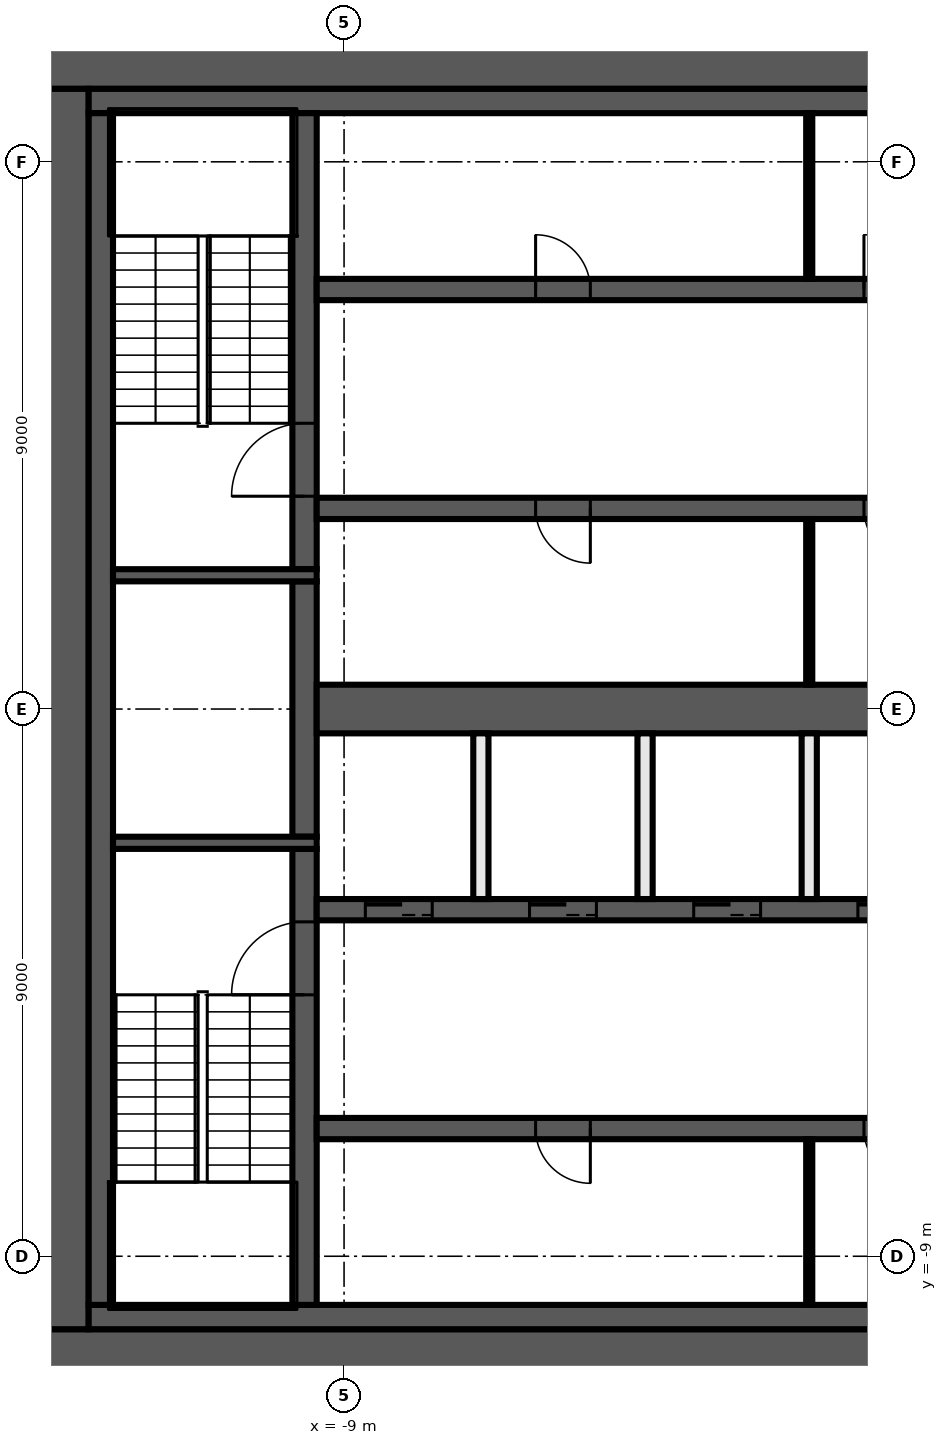
"""IFC4 building model, lengths in metres.
Left out: names, types, materials, properties, quantities, classifications, styles, units other than length and angle.
Written with IfcOpenShell. Run it as: python <this file> out.ifc"""

import sys

from ifc_helpers import new_model, si_unit, direction, frame, frame_2d, origin, place, context, subcontext, project, spatial, rectangle, extrude, element, fill, save


model = new_model("IFC4")
c1 = context("Model", 3, precision=1e-05, world=origin(), true_north=direction((0.0, 1.0)))
c2 = subcontext(c1, "Body", "Model", "MODEL_VIEW")
j1 = project(units=[si_unit("LENGTHUNIT", "METRE"), si_unit("PLANEANGLEUNIT", "RADIAN")], contexts=[c1])
p1 = place(None, origin())
s1 = spatial("IfcSite", under=j1, at=p1, CompositionType="ELEMENT")
p2 = place(p1, origin())
s2 = spatial("IfcBuilding", under=s1, at=p2, CompositionType="ELEMENT")
p3 = place(p2, frame((0.0, 0.0, 171.2)))
s3 = spatial("IfcBuildingStorey", under=s2, at=p3, CompositionType="ELEMENT", Elevation=171.2)
p4 = place(p3, frame((-14.0, 10.6, 0.0), z_axis=(0.0, 0.0, 1.0), x_axis=(1.0, 0.0, 0.0)))
e1 = element("IfcWall", 1, at=p4, inside=s3, PredefinedType="SHEAR", context=c2, shape_type="SweptSolid", body=[
    extrude(rectangle(XDim=28.0, YDim=0.8, at=frame_2d((14.0, 0.0))), origin(), (0.0, 0.0, 1.0), 3.82),
])
p5 = place(p4, frame((15.9, 0.0, 0.0)))
e2 = element("IfcOpeningElement", 2, at=p5, cuts=e1, PredefinedType="OPENING", context=c2, shape_type="SweptSolid", body=[
    extrude(rectangle(XDim=1.6, YDim=2.1, at=frame_2d((0.8, 1.05))), frame((0.0, 0.41, 0.0), z_axis=(0.0, -1.0, 0.0), x_axis=(1.0, 0.0, 0.0)), (0.0, 0.0, 1.0), 0.82),
])
p6 = place(p3, frame((14.0, -10.6, 0.0), z_axis=(0.0, 0.0, 1.0), x_axis=(-1.0, 0.0, 0.0)))
e3 = element("IfcWall", 3, at=p6, inside=s3, PredefinedType="SHEAR", context=c2, shape_type="SweptSolid", body=[
    extrude(rectangle(XDim=28.0, YDim=0.8, at=frame_2d((14.0, 0.0))), origin(), (0.0, 0.0, 1.0), 3.82),
])
p7 = place(p6, frame((5.1, 0.0, 0.0)))
e4 = element("IfcOpeningElement", 4, at=p7, cuts=e3, PredefinedType="OPENING", context=c2, shape_type="SweptSolid", body=[
    extrude(rectangle(XDim=1.6, YDim=2.1, at=frame_2d((0.8, 1.05))), frame((0.0, 0.41, 0.0), z_axis=(0.0, -1.0, 0.0), x_axis=(1.0, 0.0, 0.0)), (0.0, 0.0, 1.0), 0.82),
])
p8 = place(p3, frame((-13.6, -10.2, 0.0), z_axis=(0.0, 0.0, 1.0), x_axis=(0.0, 1.0, 0.0)))
e5 = element("IfcWall", 5, at=p8, inside=s3, PredefinedType="SHEAR", context=c2, shape_type="SweptSolid", body=[
    extrude(rectangle(XDim=20.4, YDim=0.8, at=frame_2d((10.2, 0.0))), origin(), (0.0, 0.0, 1.0), 3.82),
])
p9 = place(p3, frame((-13.2, 10.0, 0.0), z_axis=(0.0, 0.0, 1.0), x_axis=(1.0, 0.0, 0.0)))
e6 = element("IfcWall", 6, at=p9, inside=s3, PredefinedType="SHEAR", context=c2, shape_type="SweptSolid", body=[
    extrude(rectangle(XDim=14.7, YDim=0.4, at=frame_2d((7.35, 0.0))), origin(), (0.0, 0.0, 1.0), 3.82),
])
p10 = place(p3, frame((6.9, -10.0, 0.0), z_axis=(0.0, 0.0, 1.0), x_axis=(-1.0, 0.0, 0.0)))
e7 = element("IfcWall", 7, at=p10, inside=s3, PredefinedType="SHEAR", context=c2, shape_type="SweptSolid", body=[
    extrude(rectangle(XDim=20.1, YDim=0.4, at=frame_2d((10.05, 0.0))), origin(), (0.0, 0.0, 1.0), 3.82),
])
p11 = place(p3, frame((-13.0, -9.8, 0.0), z_axis=(0.0, 0.0, 1.0), x_axis=(0.0, 1.0, 0.0)))
e8 = element("IfcWall", 8, at=p11, inside=s3, PredefinedType="SHEAR", context=c2, shape_type="SweptSolid", body=[
    extrude(rectangle(XDim=19.6, YDim=0.4, at=frame_2d((9.8, 0.0))), origin(), (0.0, 0.0, 1.0), 3.82),
])
p12 = place(p3, frame((-9.65, -9.8, 0.0), z_axis=(0.0, 0.0, 1.0), x_axis=(0.0, 1.0, 0.0)))
e9 = element("IfcWall", 9, at=p12, inside=s3, PredefinedType="SHEAR", context=c2, shape_type="SweptSolid", body=[
    extrude(rectangle(XDim=7.5, YDim=0.4, at=frame_2d((3.75, 0.0))), origin(), (0.0, 0.0, 1.0), 3.82),
])
p13 = place(p12, frame((5.1, 0.0, 0.0)))
e10 = element("IfcOpeningElement", 10, at=p13, cuts=e9, PredefinedType="OPENING", context=c2, shape_type="SweptSolid", body=[
    extrude(rectangle(XDim=1.2, YDim=2.1, at=frame_2d((0.6, 1.05))), frame((0.0, 0.21, 0.0), z_axis=(0.0, -1.0, 0.0), x_axis=(1.0, 0.0, 0.0)), (0.0, 0.0, 1.0), 0.42),
])
p14 = place(p3, frame((-9.65, -2.1, 0.0), z_axis=(0.0, 0.0, 1.0), x_axis=(0.0, 1.0, 0.0)))
e11 = element("IfcWall", 11, at=p14, inside=s3, PredefinedType="SHEAR", context=c2, shape_type="SweptSolid", body=[
    extrude(rectangle(XDim=4.2, YDim=0.4, at=frame_2d((2.1, 0.0))), origin(), (0.0, 0.0, 1.0), 3.82),
])
p15 = place(p3, frame((-9.65, 2.3, 0.0), z_axis=(0.0, 0.0, 1.0), x_axis=(0.0, 1.0, 0.0)))
e12 = element("IfcWall", 12, at=p15, inside=s3, PredefinedType="SHEAR", context=c2, shape_type="SweptSolid", body=[
    extrude(rectangle(XDim=7.5, YDim=0.4, at=frame_2d((3.75, 0.0))), origin(), (0.0, 0.0, 1.0), 3.82),
])
p16 = place(p15, frame((1.2, 0.0, 0.0)))
e13 = element("IfcOpeningElement", 13, at=p16, cuts=e12, PredefinedType="OPENING", context=c2, shape_type="SweptSolid", body=[
    extrude(rectangle(XDim=1.2, YDim=2.1, at=frame_2d((0.6, 1.05))), frame((0.0, 0.21, 0.0), z_axis=(0.0, -1.0, 0.0), x_axis=(1.0, 0.0, 0.0)), (0.0, 0.0, 1.0), 0.42),
])
for number, where, z_axis, x_axis in (
    (14, (-9.45, 2.2, 0.0), (0.0, 0.0, 1.0), (-1.0, 0.0, 0.0)),
    (15, (-9.45, -2.2, 0.0), (0.0, 0.0, 1.0), (-1.0, 0.0, 0.0)),
):
    element("IfcWall", number, at=place(p3, frame(where, z_axis=z_axis, x_axis=x_axis)), inside=s3, PredefinedType="SHEAR", context=c2, shape_type="SweptSolid", body=[
        extrude(rectangle(XDim=3.35, YDim=0.2, at=frame_2d((1.675, 0.0))), origin(), (0.0, 0.0, 1.0), 3.82),
    ])
p17 = place(p3, frame((-9.45, 6.9, 0.0), z_axis=(0.0, 0.0, 1.0), x_axis=(1.0, 0.0, 0.0)))
e16 = element("IfcWall", 16, at=p17, inside=s3, PredefinedType="SHEAR", context=c2, shape_type="SweptSolid", body=[
    extrude(rectangle(XDim=18.9, YDim=0.35, at=frame_2d((9.45, 0.0))), origin(), (0.0, 0.0, 1.0), 3.82),
])
p18 = place(p17, frame((11.55, 0.0, 0.0)))
e17 = element("IfcOpeningElement", 17, at=p18, cuts=e16, PredefinedType="OPENING", context=c2, shape_type="SweptSolid", body=[
    extrude(rectangle(XDim=1.2, YDim=2.1, at=frame_2d((0.6, 1.05))), frame((0.0, 0.185, 0.0), z_axis=(0.0, -1.0, 0.0), x_axis=(1.0, 0.0, 0.0)), (0.0, 0.0, 1.0), 0.37),
])
p19 = place(p17, frame((14.3, 0.0, 0.0)))
e18 = element("IfcOpeningElement", 18, at=p19, cuts=e16, PredefinedType="OPENING", context=c2, shape_type="SweptSolid", body=[
    extrude(rectangle(XDim=1.1, YDim=2.1, at=frame_2d((0.55, 1.05))), frame((0.0, 0.185, 0.0), z_axis=(0.0, -1.0, 0.0), x_axis=(1.0, 0.0, 0.0)), (0.0, 0.0, 1.0), 0.37),
])
p20 = place(p17, frame((17.0, 0.0, 0.0)))
e19 = element("IfcOpeningElement", 19, at=p20, cuts=e16, PredefinedType="OPENING", context=c2, shape_type="SweptSolid", body=[
    extrude(rectangle(XDim=1.1, YDim=2.1, at=frame_2d((0.55, 1.05))), frame((0.0, 0.185, 0.0), z_axis=(0.0, -1.0, 0.0), x_axis=(1.0, 0.0, 0.0)), (0.0, 0.0, 1.0), 0.37),
])
p21 = place(p17, frame((3.6, 0.0, 0.0)))
e20 = element("IfcOpeningElement", 20, at=p21, cuts=e16, PredefinedType="OPENING", context=c2, shape_type="SweptSolid", body=[
    extrude(rectangle(XDim=0.9, YDim=2.1, at=frame_2d((0.45, 1.05))), frame((0.0, 0.185, 0.0), z_axis=(0.0, -1.0, 0.0), x_axis=(1.0, 0.0, 0.0)), (0.0, 0.0, 1.0), 0.37),
])
p22 = place(p17, frame((9.0, 0.0, 0.0)))
e21 = element("IfcOpeningElement", 21, at=p22, cuts=e16, PredefinedType="OPENING", context=c2, shape_type="SweptSolid", body=[
    extrude(rectangle(XDim=0.9, YDim=2.1, at=frame_2d((0.45, 1.05))), frame((0.0, 0.185, 0.0), z_axis=(0.0, -1.0, 0.0), x_axis=(1.0, 0.0, 0.0)), (0.0, 0.0, 1.0), 0.37),
])
p23 = place(p3, frame((9.45, 3.3, 0.0), z_axis=(0.0, 0.0, 1.0), x_axis=(-1.0, 0.0, 0.0)))
e22 = element("IfcWall", 22, at=p23, inside=s3, PredefinedType="SHEAR", context=c2, shape_type="SweptSolid", body=[
    extrude(rectangle(XDim=18.9, YDim=0.35, at=frame_2d((9.45, 0.0))), origin(), (0.0, 0.0, 1.0), 3.82),
])
p24 = place(p23, frame((6.2, 0.0, 0.0)))
e23 = element("IfcOpeningElement", 23, at=p24, cuts=e22, PredefinedType="OPENING", context=c2, shape_type="SweptSolid", body=[
    extrude(rectangle(XDim=1.1, YDim=2.1, at=frame_2d((0.55, 1.05))), frame((0.0, 0.185, 0.0), z_axis=(0.0, -1.0, 0.0), x_axis=(1.0, 0.0, 0.0)), (0.0, 0.0, 1.0), 0.37),
])
p25 = place(p23, frame((3.5, 0.0, 0.0)))
e24 = element("IfcOpeningElement", 24, at=p25, cuts=e22, PredefinedType="OPENING", context=c2, shape_type="SweptSolid", body=[
    extrude(rectangle(XDim=1.1, YDim=2.1, at=frame_2d((0.55, 1.05))), frame((0.0, 0.185, 0.0), z_axis=(0.0, -1.0, 0.0), x_axis=(1.0, 0.0, 0.0)), (0.0, 0.0, 1.0), 0.37),
])
p26 = place(p23, frame((0.9, 0.0, 0.0)))
e25 = element("IfcOpeningElement", 25, at=p26, cuts=e22, PredefinedType="OPENING", context=c2, shape_type="SweptSolid", body=[
    extrude(rectangle(XDim=0.9, YDim=2.1, at=frame_2d((0.45, 1.05))), frame((0.0, 0.185, 0.0), z_axis=(0.0, -1.0, 0.0), x_axis=(1.0, 0.0, 0.0)), (0.0, 0.0, 1.0), 0.37),
])
p27 = place(p23, frame((14.4, 0.0, 0.0)))
e26 = element("IfcOpeningElement", 26, at=p27, cuts=e22, PredefinedType="OPENING", context=c2, shape_type="SweptSolid", body=[
    extrude(rectangle(XDim=0.9, YDim=2.1, at=frame_2d((0.45, 1.05))), frame((0.0, 0.185, 0.0), z_axis=(0.0, -1.0, 0.0), x_axis=(1.0, 0.0, 0.0)), (0.0, 0.0, 1.0), 0.37),
])
p28 = place(p23, frame((9.0, 0.0, 0.0)))
e27 = element("IfcOpeningElement", 27, at=p28, cuts=e22, PredefinedType="OPENING", context=c2, shape_type="SweptSolid", body=[
    extrude(rectangle(XDim=0.9, YDim=2.1, at=frame_2d((0.45, 1.05))), frame((0.0, 0.185, 0.0), z_axis=(0.0, -1.0, 0.0), x_axis=(1.0, 0.0, 0.0)), (0.0, 0.0, 1.0), 0.37),
])
p29 = place(p3, frame((-9.45, -3.3, 0.0), z_axis=(0.0, 0.0, 1.0), x_axis=(1.0, 0.0, 0.0)))
e28 = element("IfcWall", 28, at=p29, inside=s3, PredefinedType="SHEAR", context=c2, shape_type="SweptSolid", body=[
    extrude(rectangle(XDim=18.9, YDim=0.35, at=frame_2d((9.45, 0.0))), origin(), (0.0, 0.0, 1.0), 3.82),
])
p30 = place(p29, frame((0.8, 0.0, 0.0)))
e29 = element("IfcOpeningElement", 29, at=p30, cuts=e28, PredefinedType="OPENING", context=c2, shape_type="SweptSolid", body=[
    extrude(rectangle(XDim=1.1, YDim=2.1, at=frame_2d((0.55, 1.05))), frame((0.0, 0.185, 0.0), z_axis=(0.0, -1.0, 0.0), x_axis=(1.0, 0.0, 0.0)), (0.0, 0.0, 1.0), 0.37),
])
p31 = place(p29, frame((3.5, 0.0, 0.0)))
e30 = element("IfcOpeningElement", 30, at=p31, cuts=e28, PredefinedType="OPENING", context=c2, shape_type="SweptSolid", body=[
    extrude(rectangle(XDim=1.1, YDim=2.1, at=frame_2d((0.55, 1.05))), frame((0.0, 0.185, 0.0), z_axis=(0.0, -1.0, 0.0), x_axis=(1.0, 0.0, 0.0)), (0.0, 0.0, 1.0), 0.37),
])
p32 = place(p29, frame((6.2, 0.0, 0.0)))
e31 = element("IfcOpeningElement", 31, at=p32, cuts=e28, PredefinedType="OPENING", context=c2, shape_type="SweptSolid", body=[
    extrude(rectangle(XDim=1.1, YDim=2.1, at=frame_2d((0.55, 1.05))), frame((0.0, 0.185, 0.0), z_axis=(0.0, -1.0, 0.0), x_axis=(1.0, 0.0, 0.0)), (0.0, 0.0, 1.0), 0.37),
])
p33 = place(p29, frame((8.9, 0.0, 0.0)))
e32 = element("IfcOpeningElement", 32, at=p33, cuts=e28, PredefinedType="OPENING", context=c2, shape_type="SweptSolid", body=[
    extrude(rectangle(XDim=1.1, YDim=2.1, at=frame_2d((0.55, 1.05))), frame((0.0, 0.185, 0.0), z_axis=(0.0, -1.0, 0.0), x_axis=(1.0, 0.0, 0.0)), (0.0, 0.0, 1.0), 0.37),
])
p34 = place(p29, frame((17.0, 0.0, 0.0)))
e33 = element("IfcOpeningElement", 33, at=p34, cuts=e28, PredefinedType="OPENING", context=c2, shape_type="SweptSolid", body=[
    extrude(rectangle(XDim=1.1, YDim=2.1, at=frame_2d((0.55, 1.05))), frame((0.0, 0.185, 0.0), z_axis=(0.0, -1.0, 0.0), x_axis=(1.0, 0.0, 0.0)), (0.0, 0.0, 1.0), 0.37),
])
p35 = place(p29, frame((11.7, 0.0, 0.0)))
e34 = element("IfcOpeningElement", 34, at=p35, cuts=e28, PredefinedType="OPENING", context=c2, shape_type="SweptSolid", body=[
    extrude(rectangle(XDim=0.9, YDim=2.1, at=frame_2d((0.45, 1.05))), frame((0.0, 0.185, 0.0), z_axis=(0.0, -1.0, 0.0), x_axis=(1.0, 0.0, 0.0)), (0.0, 0.0, 1.0), 0.37),
])
p36 = place(p29, frame((14.4, 0.0, 0.0)))
e35 = element("IfcOpeningElement", 35, at=p36, cuts=e28, PredefinedType="OPENING", context=c2, shape_type="SweptSolid", body=[
    extrude(rectangle(XDim=0.9, YDim=2.1, at=frame_2d((0.45, 1.05))), frame((0.0, 0.185, 0.0), z_axis=(0.0, -1.0, 0.0), x_axis=(1.0, 0.0, 0.0)), (0.0, 0.0, 1.0), 0.37),
])
p37 = place(p3, frame((9.45, -6.9, 0.0), z_axis=(0.0, 0.0, 1.0), x_axis=(-1.0, 0.0, 0.0)))
e36 = element("IfcWall", 36, at=p37, inside=s3, PredefinedType="SHEAR", context=c2, shape_type="SweptSolid", body=[
    extrude(rectangle(XDim=18.9, YDim=0.35, at=frame_2d((9.45, 0.0))), origin(), (0.0, 0.0, 1.0), 3.82),
])
p38 = place(p37, frame((0.75, 0.0, 0.0)))
e37 = element("IfcOpeningElement", 37, at=p38, cuts=e36, PredefinedType="OPENING", context=c2, shape_type="SweptSolid", body=[
    extrude(rectangle(XDim=1.2, YDim=2.1, at=frame_2d((0.6, 1.05))), frame((0.0, 0.185, 0.0), z_axis=(0.0, -1.0, 0.0), x_axis=(1.0, 0.0, 0.0)), (0.0, 0.0, 1.0), 0.37),
])
p39 = place(p37, frame((14.4, 0.0, 0.0)))
e38 = element("IfcOpeningElement", 38, at=p39, cuts=e36, PredefinedType="OPENING", context=c2, shape_type="SweptSolid", body=[
    extrude(rectangle(XDim=0.9, YDim=2.1, at=frame_2d((0.45, 1.05))), frame((0.0, 0.185, 0.0), z_axis=(0.0, -1.0, 0.0), x_axis=(1.0, 0.0, 0.0)), (0.0, 0.0, 1.0), 0.37),
])
p40 = place(p37, frame((9.0, 0.0, 0.0)))
e39 = element("IfcOpeningElement", 39, at=p40, cuts=e36, PredefinedType="OPENING", context=c2, shape_type="SweptSolid", body=[
    extrude(rectangle(XDim=0.9, YDim=2.1, at=frame_2d((0.45, 1.05))), frame((0.0, 0.185, 0.0), z_axis=(0.0, -1.0, 0.0), x_axis=(1.0, 0.0, 0.0)), (0.0, 0.0, 1.0), 0.37),
])
p41 = place(p3, frame((-9.45, 0.0, 0.0), z_axis=(0.0, 0.0, 1.0), x_axis=(1.0, 0.0, 0.0)))
e40 = element("IfcWall", 40, at=p41, inside=s3, PredefinedType="SHEAR", context=c2, shape_type="SweptSolid", body=[
    extrude(rectangle(XDim=18.9, YDim=0.8, at=frame_2d((9.45, 0.0))), origin(), (0.0, 0.0, 1.0), 3.82),
])
for number, where, z_axis, x_axis in (
    (41, (-1.35, -9.8, 0.0), (0.0, 0.0, 1.0), (0.0, 1.0, 0.0)),
    (42, (-1.35, 0.4, 0.0), (0.0, 0.0, 1.0), (0.0, 1.0, 0.0)),
    (43, (-1.35, 7.075, 0.0), (0.0, 0.0, 1.0), (0.0, 1.0, 0.0)),
):
    element("IfcWall", number, at=place(p3, frame(where, z_axis=z_axis, x_axis=x_axis)), inside=s3, PredefinedType="PARTITIONING", context=c2, shape_type="SweptSolid", body=[
        extrude(rectangle(XDim=2.725, YDim=0.1, at=frame_2d((1.363, 0.0))), origin(), (0.0, 0.0, 1.0), 3.82),
    ])
for number, where, z_axis, x_axis in (
    (44, (-1.35, -3.125, 0.0), (0.0, 0.0, 1.0), (0.0, 1.0, 0.0)),
    (45, (-4.05, -3.125, 0.0), (0.0, 0.0, 1.0), (0.0, 1.0, 0.0)),
    (46, (-6.75, -3.125, 0.0), (0.0, 0.0, 1.0), (0.0, 1.0, 0.0)),
):
    element("IfcWall", number, at=place(p3, frame(where, z_axis=z_axis, x_axis=x_axis)), inside=s3, PredefinedType="SOLIDWALL", context=c2, shape_type="SweptSolid", body=[
        extrude(rectangle(XDim=2.725, YDim=0.25, at=frame_2d((1.363, 0.0))), origin(), (0.0, 0.0, 1.0), 3.82),
    ])
p42 = place(p30, origin())
e47 = element("IfcDoor", 47, at=p42, inside=s3, OperationType="DOUBLE_DOOR_SLIDING", PredefinedType="DOOR", context=c2, shape_type="SweptSolid", body=[
    extrude(rectangle(XDim=1.1, YDim=2.1, at=frame_2d((0.55, 1.05))), frame((0.0, 0.025, 0.0), z_axis=(0.0, -1.0, 0.0), x_axis=(1.0, 0.0, 0.0)), (0.0, 0.0, 1.0), 0.05),
])
fill(e29, e47)
p43 = place(p31, origin())
e48 = element("IfcDoor", 48, at=p43, inside=s3, OperationType="DOUBLE_DOOR_SLIDING", PredefinedType="DOOR", context=c2, shape_type="SweptSolid", body=[
    extrude(rectangle(XDim=1.1, YDim=2.1, at=frame_2d((0.55, 1.05))), frame((0.0, 0.025, 0.0), z_axis=(0.0, -1.0, 0.0), x_axis=(1.0, 0.0, 0.0)), (0.0, 0.0, 1.0), 0.05),
])
fill(e30, e48)
p44 = place(p32, origin())
e49 = element("IfcDoor", 49, at=p44, inside=s3, OperationType="DOUBLE_DOOR_SLIDING", PredefinedType="DOOR", context=c2, shape_type="SweptSolid", body=[
    extrude(rectangle(XDim=1.1, YDim=2.1, at=frame_2d((0.55, 1.05))), frame((0.0, 0.025, 0.0), z_axis=(0.0, -1.0, 0.0), x_axis=(1.0, 0.0, 0.0)), (0.0, 0.0, 1.0), 0.05),
])
fill(e31, e49)
p45 = place(p33, origin())
e50 = element("IfcDoor", 50, at=p45, inside=s3, OperationType="DOUBLE_DOOR_SLIDING", PredefinedType="DOOR", context=c2, shape_type="SweptSolid", body=[
    extrude(rectangle(XDim=1.1, YDim=2.1, at=frame_2d((0.55, 1.05))), frame((0.0, 0.025, 0.0), z_axis=(0.0, -1.0, 0.0), x_axis=(1.0, 0.0, 0.0)), (0.0, 0.0, 1.0), 0.05),
])
fill(e32, e50)
p46 = place(p21, origin())
e51 = element("IfcDoor", 51, at=p46, inside=s3, OperationType="SINGLE_SWING_RIGHT", PredefinedType="DOOR", context=c2, shape_type="SweptSolid", body=[
    extrude(rectangle(XDim=0.9, YDim=2.1, at=frame_2d((0.45, 1.05))), frame((0.0, 0.025, 0.0), z_axis=(0.0, -1.0, 0.0), x_axis=(1.0, 0.0, 0.0)), (0.0, 0.0, 1.0), 0.05),
])
fill(e20, e51)
p47 = place(p22, origin())
e52 = element("IfcDoor", 52, at=p47, inside=s3, OperationType="SINGLE_SWING_LEFT", PredefinedType="DOOR", context=c2, shape_type="SweptSolid", body=[
    extrude(rectangle(XDim=0.9, YDim=2.1, at=frame_2d((0.45, 1.05))), frame((0.0, 0.025, 0.0), z_axis=(0.0, -1.0, 0.0), x_axis=(1.0, 0.0, 0.0)), (0.0, 0.0, 1.0), 0.05),
])
fill(e21, e52)
p48 = place(p27, origin())
e53 = element("IfcDoor", 53, at=p48, inside=s3, OperationType="SINGLE_SWING_RIGHT", PredefinedType="DOOR", context=c2, shape_type="SweptSolid", body=[
    extrude(rectangle(XDim=0.9, YDim=2.1, at=frame_2d((0.45, 1.05))), frame((0.0, 0.025, 0.0), z_axis=(0.0, -1.0, 0.0), x_axis=(1.0, 0.0, 0.0)), (0.0, 0.0, 1.0), 0.05),
])
fill(e26, e53)
p49 = place(p28, origin())
e54 = element("IfcDoor", 54, at=p49, inside=s3, OperationType="SINGLE_SWING_LEFT", PredefinedType="DOOR", context=c2, shape_type="SweptSolid", body=[
    extrude(rectangle(XDim=0.9, YDim=2.1, at=frame_2d((0.45, 1.05))), frame((0.0, 0.025, 0.0), z_axis=(0.0, -1.0, 0.0), x_axis=(1.0, 0.0, 0.0)), (0.0, 0.0, 1.0), 0.05),
])
fill(e27, e54)
p50 = place(p39, origin())
e55 = element("IfcDoor", 55, at=p50, inside=s3, OperationType="SINGLE_SWING_RIGHT", PredefinedType="DOOR", context=c2, shape_type="SweptSolid", body=[
    extrude(rectangle(XDim=0.9, YDim=2.1, at=frame_2d((0.45, 1.05))), frame((0.0, 0.025, 0.0), z_axis=(0.0, -1.0, 0.0), x_axis=(1.0, 0.0, 0.0)), (0.0, 0.0, 1.0), 0.05),
])
fill(e38, e55)
p51 = place(p40, origin())
e56 = element("IfcDoor", 56, at=p51, inside=s3, OperationType="SINGLE_SWING_LEFT", PredefinedType="DOOR", context=c2, shape_type="SweptSolid", body=[
    extrude(rectangle(XDim=0.9, YDim=2.1, at=frame_2d((0.45, 1.05))), frame((0.0, 0.025, 0.0), z_axis=(0.0, -1.0, 0.0), x_axis=(1.0, 0.0, 0.0)), (0.0, 0.0, 1.0), 0.05),
])
fill(e39, e56)
p52 = place(p16, origin())
e57 = element("IfcDoor", 57, at=p52, inside=s3, OperationType="SINGLE_SWING_RIGHT", PredefinedType="DOOR", context=c2, shape_type="SweptSolid", body=[
    extrude(rectangle(XDim=1.2, YDim=2.1, at=frame_2d((0.6, 1.05))), frame((0.0, 0.025, 0.0), z_axis=(0.0, -1.0, 0.0), x_axis=(1.0, 0.0, 0.0)), (0.0, 0.0, 1.0), 0.05),
])
fill(e13, e57)
p53 = place(p13, origin())
e58 = element("IfcDoor", 58, at=p53, inside=s3, OperationType="SINGLE_SWING_LEFT", PredefinedType="DOOR", context=c2, shape_type="SweptSolid", body=[
    extrude(rectangle(XDim=1.2, YDim=2.1, at=frame_2d((0.6, 1.05))), frame((0.0, 0.025, 0.0), z_axis=(0.0, -1.0, 0.0), x_axis=(1.0, 0.0, 0.0)), (0.0, 0.0, 1.0), 0.05),
])
fill(e10, e58)
save(model, sys.argv[1])
